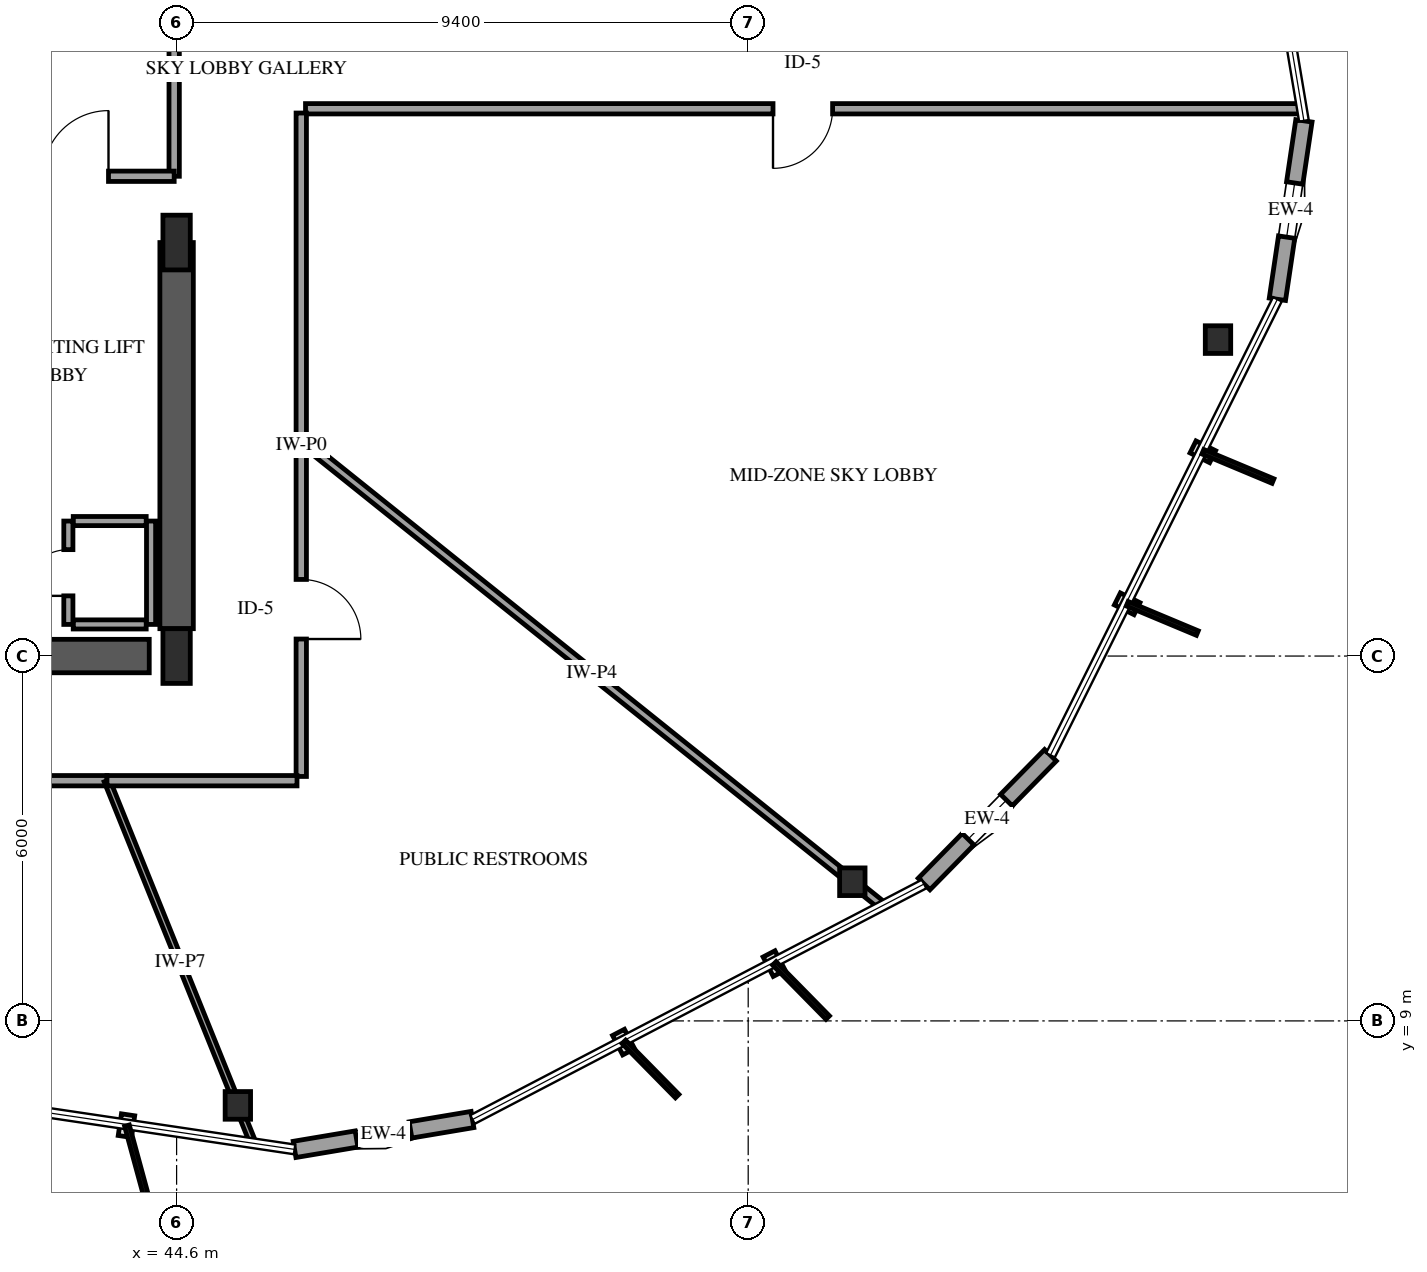
"""IFC4 building model, lengths in metres.
Left out: names, types, materials, properties, quantities, classifications, styles, units other than length and angle.
Written with IfcOpenShell. Run it as: python <this file> out.ifc"""

import sys

from ifc_helpers import new_model, si_unit, direction, frame, frame_2d, origin, origin_2d, place, context, subcontext, project, spatial, rectangle, i_section, extrude, element, fill, save


model = new_model("IFC4")
c1 = context("Model", 3, precision=1e-05, world=origin(), true_north=direction((0.0, 1.0)))
c2 = subcontext(c1, "Body", "Model", "MODEL_VIEW")
j1 = project(units=[si_unit("LENGTHUNIT", "METRE"), si_unit("PLANEANGLEUNIT", "RADIAN")], contexts=[c1])
p1 = place(None, origin())
s1 = spatial("IfcSite", under=j1, at=p1, CompositionType="ELEMENT")
p2 = place(p1, origin())
s2 = spatial("IfcBuilding", under=s1, at=p2, CompositionType="ELEMENT")
p3 = place(p2, frame((0.0, 0.0, 134.2)))
s3 = spatial("IfcBuildingStorey", under=s2, at=p3, CompositionType="ELEMENT", Elevation=134.2)
p4 = place(p3, frame((41.3, 15.0, 0.0), z_axis=(0.0, 0.0, 1.0), x_axis=(1.0, 0.0, 0.0)))
e1 = element("IfcWall", 1, at=p4, inside=s3, PredefinedType="SHEAR", context=c2, shape_type="SweptSolid", body=[
    extrude(rectangle(XDim=2.85, YDim=0.55, at=frame_2d((1.425, 0.0))), origin(), (0.0, 0.0, 1.0), 4.8),
])
p5 = place(p3, frame((44.6, 15.45, 0.0), z_axis=(0.0, 0.0, 1.0), x_axis=(0.0, 1.0, 0.0)))
e2 = element("IfcWall", 2, at=p5, inside=s3, PredefinedType="SHEAR", context=c2, shape_type="SweptSolid", body=[
    extrude(rectangle(XDim=6.35, YDim=0.55, at=frame_2d((3.175, 0.0))), origin(), (0.0, 0.0, 1.0), 4.8),
])
for number, where, z_axis, x_axis in (
    (3, (44.6, 15.0, 0.0), (0.0, 0.0, 1.0), (1.0, 0.0, 0.0)),
    (4, (44.6, 21.8, 0.0), (0.0, 0.0, 1.0), (1.0, 0.0, 0.0)),
):
    element("IfcColumn", number, at=place(p3, frame(where, z_axis=z_axis, x_axis=x_axis)), inside=s3, PredefinedType="PILASTER", context=c2, shape_type="SweptSolid", body=[
        extrude(rectangle(XDim=0.45, YDim=0.9, at=origin_2d()), origin(), (0.0, 0.0, 1.0), 4.5),
    ])
for number, where, z_axis, x_axis in (
    (5, (45.607, 7.611, 0.0), (0.0, 0.0, 1.0), (1.0, 0.0, 0.0)),
    (6, (55.712, 11.289, 0.0), (0.0, 0.0, 1.0), (1.0, 0.0, 0.0)),
    (7, (61.726, 20.204, 0.0), (0.0, 0.0, 1.0), (1.0, 0.0, 0.0)),
):
    element("IfcColumn", number, at=place(p3, frame(where, z_axis=z_axis, x_axis=x_axis)), inside=s3, PredefinedType="COLUMN", context=c2, shape_type="SweptSolid", body=[
        extrude(i_section(OverallWidth=0.418, OverallDepth=0.455, WebThickness=0.042, FlangeThickness=0.068, FilletRadius=0.038, at=origin_2d()), origin(), (0.0, 0.0, 1.0), 4.5),
    ])
p6 = place(p3, frame((46.54, 6.887, 0.0), z_axis=(0.0, 0.0, 1.0), x_axis=(0.986168353547, 0.165746729871, 0.0)))
e8 = element("IfcWall", 8, at=p6, inside=s3, PredefinedType="SOLIDWALL", context=c2, shape_type="SweptSolid", body=[
    extrude(rectangle(XDim=2.967, YDim=0.27, at=frame_2d((1.483, 0.0))), origin(), (0.0, 0.0, 1.0), 3.879),
])
p7 = place(p6, frame((1.033, 0.0, 0.75)))
e9 = element("IfcOpeningElement", 9, at=p7, cuts=e8, PredefinedType="OPENING", context=c2, shape_type="SweptSolid", body=[
    extrude(rectangle(XDim=0.9, YDim=1.5, at=frame_2d((0.45, 0.75))), frame((0.0, 0.145, 0.0), z_axis=(0.0, -1.0, 0.0), x_axis=(1.0, 0.0, 0.0)), (0.0, 0.0, 1.0), 0.29),
])
p8 = place(p3, frame((56.893, 11.251, 0.0), z_axis=(0.0, 0.0, 1.0), x_axis=(0.700409496998, 0.713741225175, 0.0)))
e10 = element("IfcWall", 10, at=p8, inside=s3, PredefinedType="SOLIDWALL", context=c2, shape_type="SweptSolid", body=[
    extrude(rectangle(XDim=2.967, YDim=0.27, at=frame_2d((1.483, 0.0))), origin(), (0.0, 0.0, 1.0), 3.879),
])
p9 = place(p8, frame((1.033, 0.0, 0.75)))
e11 = element("IfcOpeningElement", 11, at=p9, cuts=e10, PredefinedType="OPENING", context=c2, shape_type="SweptSolid", body=[
    extrude(rectangle(XDim=0.9, YDim=1.5, at=frame_2d((0.45, 0.75))), frame((0.0, 0.145, 0.0), z_axis=(0.0, -1.0, 0.0), x_axis=(1.0, 0.0, 0.0)), (0.0, 0.0, 1.0), 0.29),
])
p10 = place(p3, frame((62.703, 20.867, 0.0), z_axis=(0.0, 0.0, 1.0), x_axis=(0.147157120534, 0.989113128958, 0.0)))
e12 = element("IfcWall", 12, at=p10, inside=s3, PredefinedType="SOLIDWALL", context=c2, shape_type="SweptSolid", body=[
    extrude(rectangle(XDim=2.966, YDim=0.27, at=frame_2d((1.483, 0.0))), origin(), (0.0, 0.0, 1.0), 3.879),
])
p11 = place(p10, frame((1.033, 0.0, 0.75)))
e13 = element("IfcOpeningElement", 13, at=p11, cuts=e12, PredefinedType="OPENING", context=c2, shape_type="SweptSolid", body=[
    extrude(rectangle(XDim=0.9, YDim=1.5, at=frame_2d((0.45, 0.75))), frame((0.0, 0.145, 0.0), z_axis=(0.0, -1.0, 0.0), x_axis=(1.0, 0.0, 0.0)), (0.0, 0.0, 1.0), 0.29),
])
for number, where, z_axis, x_axis in (
    (14, (42.9, 15.52, 0.0), (0.0, 0.0, 1.0), (1.0, 0.0, 0.0)),
    (15, (42.9, 17.22, 0.0), (0.0, 0.0, 1.0), (1.0, 0.0, 0.0)),
):
    element("IfcWall", number, at=place(p3, frame(where, z_axis=z_axis, x_axis=x_axis)), inside=s3, PredefinedType="PARTITIONING", context=c2, shape_type="SweptSolid", body=[
        extrude(rectangle(XDim=1.2, YDim=0.15, at=frame_2d((0.6, 0.0))), origin(), (0.0, 0.0, 1.0), 4.5),
    ])
p12 = place(p3, frame((44.18, 15.52, 0.0), z_axis=(0.0, 0.0, 1.0), x_axis=(0.0, 1.0, 0.0)))
e16 = element("IfcWall", 16, at=p12, inside=s3, PredefinedType="PARTITIONING", context=c2, shape_type="SweptSolid", body=[
    extrude(rectangle(XDim=1.7, YDim=0.15, at=frame_2d((0.85, 0.0))), origin(), (0.0, 0.0, 1.0), 4.5),
])
p13 = place(p3, frame((42.82, 15.52, 0.0), z_axis=(0.0, 0.0, 1.0), x_axis=(0.0, 1.0, 0.0)))
e17 = element("IfcWall", 17, at=p13, inside=s3, PredefinedType="PARTITIONING", context=c2, shape_type="SweptSolid", body=[
    extrude(rectangle(XDim=1.7, YDim=0.15, at=frame_2d((0.85, 0.0))), origin(), (0.0, 0.0, 1.0), 4.5),
])
p14 = place(p13, frame((0.47, 0.0, 0.0)))
e18 = element("IfcOpeningElement", 18, at=p14, cuts=e17, PredefinedType="OPENING", context=c2, shape_type="SweptSolid", body=[
    extrude(rectangle(XDim=0.76, YDim=2.0, at=frame_2d((0.38, 1.0))), frame((0.0, 0.085, 0.0), z_axis=(0.0, -1.0, 0.0), x_axis=(1.0, 0.0, 0.0)), (0.0, 0.0, 1.0), 0.17),
])
p15 = place(p3, frame((63.106, 24.0, 0.0), z_axis=(0.0, 0.0, 1.0), x_axis=(-1.0, 0.0, 0.0)))
e19 = element("IfcWall", 19, at=p15, inside=s3, PredefinedType="PARTITIONING", context=c2, shape_type="SweptSolid", body=[
    extrude(rectangle(XDim=16.386, YDim=0.17, at=frame_2d((8.193, 0.0))), origin(), (0.0, 0.0, 1.0), 4.5),
])
p16 = place(p15, frame((7.718, 0.0, 0.0)))
e20 = element("IfcOpeningElement", 20, at=p16, cuts=e19, PredefinedType="OPENING", context=c2, shape_type="SweptSolid", body=[
    extrude(rectangle(XDim=0.98, YDim=2.15, at=frame_2d((0.49, 1.075))), frame((0.0, 0.095, 0.0), z_axis=(0.0, -1.0, 0.0), x_axis=(1.0, 0.0, 0.0)), (0.0, 0.0, 1.0), 0.19),
])
p17 = place(p3, frame((46.65, 18.55, 0.0), z_axis=(0.0, 0.0, 1.0), x_axis=(0.780419315433, -0.625256501045, 0.0)))
e21 = element("IfcWall", 21, at=p17, inside=s3, PredefinedType="PARTITIONING", context=c2, shape_type="SweptSolid", body=[
    extrude(rectangle(XDim=12.246, YDim=0.14, at=frame_2d((6.123, 0.0))), origin(), (0.0, 0.0, 1.0), 2.79),
])
p18 = place(p3, frame((43.455, 12.95, 0.0), z_axis=(0.0, 0.0, 1.0), x_axis=(-1.0, 0.0, 0.0)))
e22 = element("IfcWall", 22, at=p18, inside=s3, PredefinedType="PARTITIONING", context=c2, shape_type="SweptSolid", body=[
    extrude(rectangle(XDim=11.432, YDim=0.17, at=frame_2d((5.716, 0.0))), origin(), (0.0, 0.0, 1.0), 4.5),
])
p19 = place(p18, frame((5.241, 0.0, 0.0)))
e23 = element("IfcOpeningElement", 23, at=p19, cuts=e22, PredefinedType="OPENING", context=c2, shape_type="SweptSolid", body=[
    extrude(rectangle(XDim=0.98, YDim=2.15, at=frame_2d((0.49, 1.075))), frame((0.0, 0.095, 0.0), z_axis=(0.0, -1.0, 0.0), x_axis=(1.0, 0.0, 0.0)), (0.0, 0.0, 1.0), 0.19),
])
p20 = place(p3, frame((44.56, 29.8, 0.0), z_axis=(0.0, 0.0, 1.0), x_axis=(0.0, -1.0, 0.0)))
e24 = element("IfcWall", 24, at=p20, inside=s3, PredefinedType="PARTITIONING", context=c2, shape_type="SweptSolid", body=[
    extrude(rectangle(XDim=6.91, YDim=0.17, at=frame_2d((3.455, 0.0))), origin(), (0.0, 0.0, 1.0), 3.54),
])
p21 = place(p20, frame((2.915, 0.0, 0.0)))
e25 = element("IfcOpeningElement", 25, at=p21, cuts=e24, PredefinedType="OPENING", context=c2, shape_type="SweptSolid", body=[
    extrude(rectangle(XDim=1.08, YDim=2.15, at=frame_2d((0.54, 1.075))), frame((0.0, 0.095, 0.0), z_axis=(0.0, -1.0, 0.0), x_axis=(1.0, 0.0, 0.0)), (0.0, 0.0, 1.0), 0.19),
])
p22 = place(p3, frame((43.455, 12.95, 0.0), z_axis=(0.0, 0.0, 1.0), x_axis=(0.373812359394, -0.927504350375, 0.0)))
e26 = element("IfcWall", 26, at=p22, inside=s3, PredefinedType="PARTITIONING", context=c2, shape_type="SweptSolid", body=[
    extrude(rectangle(XDim=6.428, YDim=0.1, at=frame_2d((3.214, 0.0))), origin(), (0.0, 0.0, 1.0), 2.79),
])
p23 = place(p3, frame((46.65, 18.55, 0.0), z_axis=(0.0, 0.0, 1.0), x_axis=(0.0, -1.0, 0.0)))
e27 = element("IfcWall", 27, at=p23, inside=s3, PredefinedType="PARTITIONING", context=c2, shape_type="SweptSolid", body=[
    extrude(rectangle(XDim=5.53, YDim=0.17, at=frame_2d((2.765, 0.0))), origin(), (0.0, 0.0, 1.0), 4.5),
])
p24 = place(p23, frame((2.29, 0.0, 0.0)))
e28 = element("IfcOpeningElement", 28, at=p24, cuts=e27, PredefinedType="OPENING", context=c2, shape_type="SweptSolid", body=[
    extrude(rectangle(XDim=0.98, YDim=2.15, at=frame_2d((0.49, 1.075))), frame((0.0, 0.095, 0.0), z_axis=(0.0, -1.0, 0.0), x_axis=(1.0, 0.0, 0.0)), (0.0, 0.0, 1.0), 0.19),
])
p25 = place(p3, frame((46.65, 23.93, 0.0), z_axis=(0.0, 0.0, 1.0), x_axis=(0.0, -1.0, 0.0)))
e29 = element("IfcWall", 29, at=p25, inside=s3, PredefinedType="PARTITIONING", context=c2, shape_type="SweptSolid", body=[
    extrude(rectangle(XDim=5.38, YDim=0.17, at=frame_2d((2.69, 0.0))), origin(), (0.0, 0.0, 1.0), 4.5),
])
p26 = place(p3, frame((41.32, 22.89, 0.0), z_axis=(0.0, 0.0, 1.0), x_axis=(1.0, 0.0, 0.0)))
e30 = element("IfcWall", 30, at=p26, inside=s3, PredefinedType="PARTITIONING", context=c2, shape_type="SweptSolid", body=[
    extrude(rectangle(XDim=3.24, YDim=0.17, at=frame_2d((1.62, 0.0))), origin(), (0.0, 0.0, 1.0), 4.5),
])
p27 = place(p26, frame((1.08, 0.0, 0.0)))
e31 = element("IfcOpeningElement", 31, at=p27, cuts=e30, PredefinedType="OPENING", context=c2, shape_type="SweptSolid", body=[
    extrude(rectangle(XDim=1.08, YDim=2.15, at=frame_2d((0.54, 1.075))), frame((0.0, 0.095, 0.0), z_axis=(0.0, -1.0, 0.0), x_axis=(1.0, 0.0, 0.0)), (0.0, 0.0, 1.0), 0.19),
])
p28 = place(p3, frame((46.58, 12.95, 0.0), z_axis=(0.0, 0.0, 1.0), x_axis=(-1.0, 0.0, 0.0)))
e32 = element("IfcWall", 32, at=p28, inside=s3, PredefinedType="PARTITIONING", context=c2, shape_type="SweptSolid", body=[
    extrude(rectangle(XDim=3.125, YDim=0.17, at=frame_2d((1.562, 0.0))), origin(), (0.0, 0.0, 1.0), 4.5),
])
p29 = place(p7, origin())
e33 = element("IfcWindow", 33, at=p29, inside=s3, PartitioningType="SINGLE_PANEL", PredefinedType="WINDOW", context=c2, shape_type="SweptSolid", body=[
    extrude(rectangle(XDim=0.9, YDim=1.5, at=frame_2d((0.45, 0.75))), frame((0.0, 0.03, 0.0), z_axis=(0.0, -1.0, 0.0), x_axis=(1.0, 0.0, 0.0)), (0.0, 0.0, 1.0), 0.06),
])
fill(e9, e33)
p30 = place(p9, origin())
e34 = element("IfcWindow", 34, at=p30, inside=s3, PartitioningType="SINGLE_PANEL", PredefinedType="WINDOW", context=c2, shape_type="SweptSolid", body=[
    extrude(rectangle(XDim=0.9, YDim=1.5, at=frame_2d((0.45, 0.75))), frame((0.0, 0.03, 0.0), z_axis=(0.0, -1.0, 0.0), x_axis=(1.0, 0.0, 0.0)), (0.0, 0.0, 1.0), 0.06),
])
fill(e11, e34)
p31 = place(p11, origin())
e35 = element("IfcWindow", 35, at=p31, inside=s3, PartitioningType="SINGLE_PANEL", PredefinedType="WINDOW", context=c2, shape_type="SweptSolid", body=[
    extrude(rectangle(XDim=0.9, YDim=1.5, at=frame_2d((0.45, 0.75))), frame((0.0, 0.03, 0.0), z_axis=(0.0, -1.0, 0.0), x_axis=(1.0, 0.0, 0.0)), (0.0, 0.0, 1.0), 0.06),
])
fill(e13, e35)
p32 = place(p14, origin())
e36 = element("IfcDoor", 36, at=p32, inside=s3, OperationType="SINGLE_SWING_LEFT", PredefinedType="TRAPDOOR", context=c2, shape_type="SweptSolid", body=[
    extrude(rectangle(XDim=0.76, YDim=2.0, at=frame_2d((0.38, 1.0))), frame((0.0, 0.025, 0.0), z_axis=(0.0, -1.0, 0.0), x_axis=(1.0, 0.0, 0.0)), (0.0, 0.0, 1.0), 0.05),
])
fill(e18, e36)
p33 = place(p16, origin())
e37 = element("IfcDoor", 37, at=p33, inside=s3, OperationType="SINGLE_SWING_RIGHT", PredefinedType="DOOR", context=c2, shape_type="SweptSolid", body=[
    extrude(rectangle(XDim=0.98, YDim=2.15, at=frame_2d((0.49, 1.075))), frame((0.0, 0.025, 0.0), z_axis=(0.0, -1.0, 0.0), x_axis=(1.0, 0.0, 0.0)), (0.0, 0.0, 1.0), 0.05),
])
fill(e20, e37)
p34 = place(p24, origin())
e38 = element("IfcDoor", 38, at=p34, inside=s3, OperationType="SINGLE_SWING_RIGHT", PredefinedType="DOOR", context=c2, shape_type="SweptSolid", body=[
    extrude(rectangle(XDim=0.98, YDim=2.15, at=frame_2d((0.49, 1.075))), frame((0.0, 0.025, 0.0), z_axis=(0.0, -1.0, 0.0), x_axis=(1.0, 0.0, 0.0)), (0.0, 0.0, 1.0), 0.05),
])
fill(e28, e38)
p35 = place(p27, origin())
e39 = element("IfcDoor", 39, at=p35, inside=s3, OperationType="SINGLE_SWING_RIGHT", PredefinedType="DOOR", context=c2, shape_type="SweptSolid", body=[
    extrude(rectangle(XDim=1.08, YDim=2.15, at=frame_2d((0.54, 1.075))), frame((0.0, 0.025, 0.0), z_axis=(0.0, -1.0, 0.0), x_axis=(1.0, 0.0, 0.0)), (0.0, 0.0, 1.0), 0.05),
])
fill(e31, e39)
save(model, sys.argv[1])
